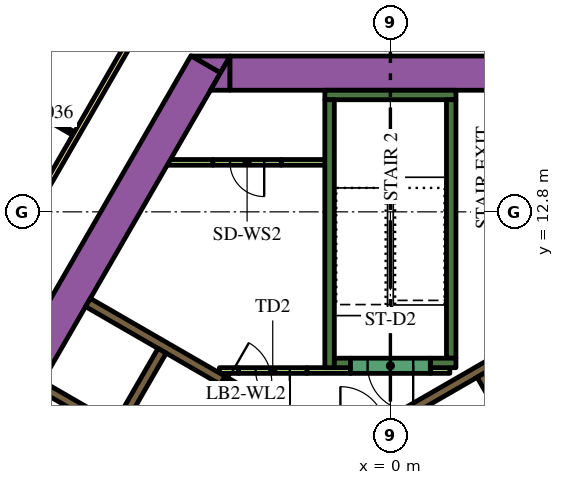
"""IFC4 building model, lengths in metres.
Left out: names, types, materials, properties, quantities, classifications, styles, units other than length and angle.
Written with IfcOpenShell. Run it as: python <this file> out.ifc"""

import sys

from ifc_helpers import new_model, si_unit, direction, frame, frame_2d, origin, place, context, subcontext, project, spatial, polyline, rectangle, outline, extrude, element, fill, save


model = new_model("IFC4")
c1 = context("Model", 3, precision=1e-05, world=origin(), true_north=direction((0.0, 1.0)))
c2 = subcontext(c1, "Body", "Model", "MODEL_VIEW")
j1 = project(units=[si_unit("LENGTHUNIT", "METRE"), si_unit("PLANEANGLEUNIT", "RADIAN")], contexts=[c1])
p1 = place(None, origin())
s1 = spatial("IfcSite", under=j1, at=p1, CompositionType="ELEMENT")
p2 = place(p1, origin())
s2 = spatial("IfcBuilding", under=s1, at=p2, CompositionType="ELEMENT")
p3 = place(p2, frame((0.0, 0.0, 62.7)))
s3 = spatial("IfcBuildingStorey", under=s2, at=p3, CompositionType="ELEMENT", Elevation=62.7)
p4 = place(p3, frame((-14.268, 0.387, 0.0), z_axis=(0.0, 0.0, 1.0), x_axis=(0.499994617707, 0.866028511231, 0.0)))
e1 = element("IfcWall", 1, at=p4, inside=s3, PredefinedType="SOLIDWALL", context=c2, shape_type="SweptSolid", body=[
    extrude(rectangle(XDim=18.817, YDim=0.9, at=frame_2d((9.409, 0.0))), origin(), (0.0, 0.0, 1.0), 3.9),
])
p5 = place(p3, origin())
e2 = element("IfcWall", 2, at=p5, inside=s3, PredefinedType="SOLIDWALL", context=c2, shape_type="SweptSolid", body=[
    extrude(outline(polyline([(-4.215, 16.9), (-4.469, 16.46), (-5.231, 16.9), (-4.215, 16.9)])), origin(), (0.0, 0.0, 1.0), 3.9),
])
p6 = place(p3, frame((-4.224, 16.45, 0.0), z_axis=(0.0, 0.0, 1.0), x_axis=(1.0, 0.0, 0.0)))
e3 = element("IfcWall", 3, at=p6, inside=s3, PredefinedType="SOLIDWALL", context=c2, shape_type="SweptSolid", body=[
    extrude(rectangle(XDim=9.488, YDim=0.9, at=frame_2d((4.744, 0.0))), origin(), (0.0, 0.0, 1.0), 3.9),
])
e4 = element("IfcWall", 4, at=p5, inside=s3, PredefinedType="SOLIDWALL", context=c2, shape_type="SweptSolid", body=[
    extrude(outline(polyline([(-4.734, 16.0), (-4.226, 16.88), (-4.226, 16.0), (-4.734, 16.0)])), origin(), (0.0, 0.0, 1.0), 3.9),
])
p7 = place(p3, frame((-1.725, 15.875, 0.0), z_axis=(0.0, 0.0, 1.0), x_axis=(1.0, 0.0, 0.0)))
e5 = element("IfcWall", 5, at=p7, inside=s3, PredefinedType="SOLIDWALL", context=c2, shape_type="SweptSolid", body=[
    extrude(rectangle(XDim=3.45, YDim=0.25, at=frame_2d((1.725, 0.0))), origin(), (0.0, 0.0, 1.0), 3.9),
])
p8 = place(p3, frame((1.6, 8.95, 0.0), z_axis=(0.0, 0.0, 1.0), x_axis=(0.0, 1.0, 0.0)))
e6 = element("IfcWall", 6, at=p8, inside=s3, PredefinedType="SOLIDWALL", context=c2, shape_type="SweptSolid", body=[
    extrude(rectangle(XDim=6.8, YDim=0.25, at=frame_2d((3.4, 0.0))), origin(), (0.0, 0.0, 1.0), 3.9),
])
p9 = place(p3, frame((1.05, 8.825, 0.0), z_axis=(0.0, 0.0, 1.0), x_axis=(1.0, 0.0, 0.0)))
e7 = element("IfcWall", 7, at=p9, inside=s3, PredefinedType="SOLIDWALL", context=c2, shape_type="SweptSolid", body=[
    extrude(rectangle(XDim=0.675, YDim=0.25, at=frame_2d((0.337, 0.0))), origin(), (0.0, 0.0, 1.0), 3.9),
])
p10 = place(p3, frame((-1.6, 8.7, 0.0), z_axis=(0.0, 0.0, 1.0), x_axis=(0.0, 1.0, 0.0)))
e8 = element("IfcWall", 8, at=p10, inside=s3, PredefinedType="SOLIDWALL", context=c2, shape_type="SweptSolid", body=[
    extrude(rectangle(XDim=7.05, YDim=0.25, at=frame_2d((3.525, 0.0))), origin(), (0.0, 0.0, 1.0), 3.9),
])
p11 = place(p3, frame((-1.475, 8.825, 0.0), z_axis=(0.0, 0.0, 1.0), x_axis=(1.0, 0.0, 0.0)))
e9 = element("IfcWall", 9, at=p11, inside=s3, PredefinedType="SOLIDWALL", context=c2, shape_type="SweptSolid", body=[
    extrude(rectangle(XDim=0.425, YDim=0.25, at=frame_2d((0.212, 0.0))), origin(), (0.0, 0.0, 1.0), 3.9),
])
p12 = place(p3, frame((0.314, 7.456, 0.0), z_axis=(0.0, 0.0, 1.0), x_axis=(0.866013897511, 0.50001992892, 0.0)))
e10 = element("IfcWall", 10, at=p12, inside=s3, PredefinedType="SOLIDWALL", context=c2, shape_type="SweptSolid", body=[
    extrude(rectangle(XDim=3.268, YDim=0.25, at=frame_2d((1.634, 0.0))), origin(), (0.0, 0.0, 1.0), 3.9),
])
e11 = element("IfcWall", 11, at=p5, inside=s3, PredefinedType="SOLIDWALL", context=c2, shape_type="SweptSolid", body=[
    extrude(outline(polyline([(-3.128, 7.481), (-3.259, 7.557), (-3.134, 7.773), (-3.003, 7.698), (-3.128, 7.481)])), origin(), (0.0, 0.0, 1.0), 3.9),
])
p13 = place(p3, frame((-7.314, 7.132, 0.0), z_axis=(0.0, 0.0, 1.0), x_axis=(-0.866008176907, 0.50002983664, 0.0)))
e12 = element("IfcWall", 12, at=p13, inside=s3, PredefinedType="SOLIDWALL", context=c2, shape_type="SweptSolid", body=[
    extrude(rectangle(XDim=2.2, YDim=0.25, at=frame_2d((1.1, 0.0))), origin(), (0.0, 0.0, 1.0), 3.9),
])
p14 = place(p3, frame((-7.959, 10.415, 0.0), z_axis=(0.0, 0.0, 1.0), x_axis=(0.866020958405, -0.500007699544, 0.0)))
e13 = element("IfcWall", 13, at=p14, inside=s3, PredefinedType="SOLIDWALL", context=c2, shape_type="SweptSolid", body=[
    extrude(rectangle(XDim=4.1, YDim=0.25, at=frame_2d((2.05, 0.0))), origin(), (0.0, 0.0, 1.0), 3.9),
])
p15 = place(p3, frame((-3.997, 8.625, 0.0), z_axis=(0.0, 0.0, 1.0), x_axis=(-1.0, 0.0, 0.0)))
e14 = element("IfcWall", 14, at=p15, inside=s3, PredefinedType="PARTITIONING", context=c2, shape_type="SweptSolid", body=[
    extrude(rectangle(XDim=0.502, YDim=0.15, at=frame_2d((0.251, 0.0))), origin(), (0.0, 0.0, 1.0), 2.75),
])
p16 = place(p3, frame((-5.851, 14.102, 0.0), z_axis=(0.0, 0.0, 1.0), x_axis=(1.0, 0.0, 0.0)))
e15 = element("IfcWall", 15, at=p16, inside=s3, PredefinedType="PARTITIONING", context=c2, shape_type="SweptSolid", body=[
    extrude(rectangle(XDim=1.18, YDim=0.15, at=frame_2d((0.59, 0.0))), origin(), (0.0, 0.0, 1.0), 2.75),
])
p17 = place(p3, frame((-2.196, 8.625, 0.0), z_axis=(0.0, 0.0, 1.0), x_axis=(1.0, 0.0, 0.0)))
e16 = element("IfcWall", 16, at=p17, inside=s3, PredefinedType="PARTITIONING", context=c2, shape_type="SweptSolid", body=[
    extrude(rectangle(XDim=1.146, YDim=0.15, at=frame_2d((0.573, 0.0))), origin(), (0.0, 0.0, 1.0), 2.75),
])
p18 = place(p3, frame((1.05, 8.625, 0.0), z_axis=(0.0, 0.0, 1.0), x_axis=(1.0, 0.0, 0.0)))
e17 = element("IfcWall", 17, at=p18, inside=s3, PredefinedType="PARTITIONING", context=c2, shape_type="SweptSolid", body=[
    extrude(rectangle(XDim=0.514, YDim=0.15, at=frame_2d((0.257, 0.0))), origin(), (0.0, 0.0, 1.0), 2.75),
])
p19 = place(p3, frame((-2.871, 14.102, 0.0), z_axis=(0.0, 0.0, 1.0), x_axis=(1.0, 0.0, 0.0)))
e18 = element("IfcWall", 18, at=p19, inside=s3, PredefinedType="PARTITIONING", context=c2, shape_type="SweptSolid", body=[
    extrude(rectangle(XDim=1.196, YDim=0.15, at=frame_2d((0.598, 0.0))), origin(), (0.0, 0.0, 1.0), 2.75),
])
p20 = place(p3, frame((8.565, -2.185, 0.0), z_axis=(0.0, 0.0, 1.0), x_axis=(-0.499997954832, 0.866026584559, 0.0)))
e19 = element("IfcWall", 19, at=p20, inside=s3, PredefinedType="SOLIDWALL", context=c2, shape_type="SweptSolid", body=[
    extrude(rectangle(XDim=12.35, YDim=0.25, at=frame_2d((6.175, 0.0))), origin(), (0.0, 0.0, 1.0), 3.9),
])
p21 = place(p20, frame((5.725, 0.0, 0.0)))
e20 = element("IfcOpeningElement", 20, at=p21, cuts=e19, PredefinedType="OPENING", context=c2, shape_type="SweptSolid", body=[
    extrude(rectangle(XDim=0.9, YDim=2.1, at=frame_2d((0.45, 1.05))), frame((0.0, 0.135, 0.0), z_axis=(0.0, -1.0, 0.0), x_axis=(1.0, 0.0, 0.0)), (0.0, 0.0, 1.0), 0.27),
])
p22 = place(p3, frame((-6.008, 9.144, 0.0), z_axis=(0.0, 0.0, 1.0), x_axis=(-0.500006956611, -0.866021387346, 0.0)))
e21 = element("IfcWall", 21, at=p22, inside=s3, PredefinedType="SOLIDWALL", context=c2, shape_type="SweptSolid", body=[
    extrude(rectangle(XDim=9.83, YDim=0.25, at=frame_2d((4.915, 0.0))), origin(), (0.0, 0.0, 1.0), 3.9),
])
p23 = place(p22, frame((6.985, 0.0, 0.0)))
e22 = element("IfcOpeningElement", 22, at=p23, cuts=e21, PredefinedType="OPENING", context=c2, shape_type="SweptSolid", body=[
    extrude(rectangle(XDim=0.9, YDim=2.1, at=frame_2d((0.45, 1.05))), frame((0.0, 0.135, 0.0), z_axis=(0.0, -1.0, 0.0), x_axis=(1.0, 0.0, 0.0)), (0.0, 0.0, 1.0), 0.27),
])
p24 = place(p3, frame((1.05, 8.75, 0.0), z_axis=(0.0, 0.0, 1.0), x_axis=(-1.0, 0.0, 0.0)))
e23 = element("IfcWall", 23, at=p24, inside=s3, PredefinedType="SOLIDWALL", context=c2, shape_type="SweptSolid", body=[
    extrude(rectangle(XDim=2.1, YDim=0.4, at=frame_2d((1.05, 0.0))), origin(), (0.0, 0.0, 1.0), 3.9),
])
p25 = place(p24, frame((0.45, 0.0, 0.0)))
e24 = element("IfcOpeningElement", 24, at=p25, cuts=e23, PredefinedType="OPENING", context=c2, shape_type="SweptSolid", body=[
    extrude(rectangle(XDim=1.2, YDim=2.1, at=frame_2d((0.6, 1.05))), frame((0.0, 0.21, 0.0), z_axis=(0.0, -1.0, 0.0), x_axis=(1.0, 0.0, 0.0)), (0.0, 0.0, 1.0), 0.42),
])
p26 = place(p3, frame((-2.196, 8.625, 0.0), z_axis=(0.0, 0.0, 1.0), x_axis=(-1.0, 0.0, 0.0)))
e25 = element("IfcWall", 25, at=p26, inside=s3, PredefinedType="PARTITIONING", context=c2, shape_type="SweptSolid", body=[
    extrude(rectangle(XDim=1.8, YDim=0.15, at=frame_2d((0.9, 0.0))), origin(), (0.0, 0.0, 1.0), 2.75),
])
p27 = place(p26, frame((0.45, 0.0, 0.0)))
e26 = element("IfcOpeningElement", 26, at=p27, cuts=e25, PredefinedType="OPENING", context=c2, shape_type="SweptSolid", body=[
    extrude(rectangle(XDim=0.9, YDim=2.1, at=frame_2d((0.45, 1.05))), frame((0.0, 0.085, 0.0), z_axis=(0.0, -1.0, 0.0), x_axis=(1.0, 0.0, 0.0)), (0.0, 0.0, 1.0), 0.17),
])
p28 = place(p3, frame((-4.409, 8.365, 0.0), z_axis=(0.0, 0.0, 1.0), x_axis=(0.866034573852, -0.49998411664, 0.0)))
e27 = element("IfcWall", 27, at=p28, inside=s3, PredefinedType="SOLIDWALL", context=c2, shape_type="SweptSolid", body=[
    extrude(rectangle(XDim=1.4, YDim=0.25, at=frame_2d((0.7, 0.0))), origin(), (0.0, 0.0, 1.0), 3.9),
])
p29 = place(p28, frame((0.1, 0.0, 0.0)))
e28 = element("IfcOpeningElement", 28, at=p29, cuts=e27, PredefinedType="OPENING", context=c2, shape_type="SweptSolid", body=[
    extrude(rectangle(XDim=1.2, YDim=2.1, at=frame_2d((0.6, 1.05))), frame((0.0, 0.135, 0.0), z_axis=(0.0, -1.0, 0.0), x_axis=(1.0, 0.0, 0.0)), (0.0, 0.0, 1.0), 0.27),
])
p30 = place(p3, frame((-2.871, 14.102, 0.0), z_axis=(0.0, 0.0, 1.0), x_axis=(-1.0, 0.0, 0.0)))
e29 = element("IfcWall", 29, at=p30, inside=s3, PredefinedType="PARTITIONING", context=c2, shape_type="SweptSolid", body=[
    extrude(rectangle(XDim=1.8, YDim=0.15, at=frame_2d((0.9, 0.0))), origin(), (0.0, 0.0, 1.0), 2.75),
])
p31 = place(p30, frame((0.45, 0.0, 0.0)))
e30 = element("IfcOpeningElement", 30, at=p31, cuts=e29, PredefinedType="OPENING", context=c2, shape_type="SweptSolid", body=[
    extrude(rectangle(XDim=0.9, YDim=2.1, at=frame_2d((0.45, 1.05))), frame((0.0, 0.085, 0.0), z_axis=(0.0, -1.0, 0.0), x_axis=(1.0, 0.0, 0.0)), (0.0, 0.0, 1.0), 0.17),
])
p32 = place(p3, frame((-19.081, -3.9, 0.0), z_axis=(0.0, 0.0, 1.0), x_axis=(0.499998313975, 0.866026377209, 0.0)))
e31 = element("IfcWall", 31, at=p32, inside=s3, PredefinedType="PARTITIONING", context=c2, shape_type="SweptSolid", body=[
    extrude(rectangle(XDim=25.766, YDim=0.15, at=frame_2d((12.883, 0.0))), origin(), (0.0, 0.0, 1.0), 2.75),
])
p33 = place(p32, frame((24.586, 0.0, 0.0)))
e32 = element("IfcOpeningElement", 32, at=p33, cuts=e31, PredefinedType="OPENING", context=c2, shape_type="SweptSolid", body=[
    extrude(rectangle(XDim=1.0, YDim=2.1, at=frame_2d((0.5, 1.05))), frame((0.0, 0.085, 0.0), z_axis=(0.0, -1.0, 0.0), x_axis=(1.0, 0.0, 0.0)), (0.0, 0.0, 1.0), 0.17),
])
p34 = place(p32, frame((9.948, 0.0, 0.0)))
e33 = element("IfcOpeningElement", 33, at=p34, cuts=e31, PredefinedType="OPENING", context=c2, shape_type="SweptSolid", body=[
    extrude(rectangle(XDim=1.0, YDim=2.1, at=frame_2d((0.5, 1.05))), frame((0.0, 0.085, 0.0), z_axis=(0.0, -1.0, 0.0), x_axis=(1.0, 0.0, 0.0)), (0.0, 0.0, 1.0), 0.17),
])
p35 = place(p32, frame((7.782, 0.0, 0.0)))
e34 = element("IfcOpeningElement", 34, at=p35, cuts=e31, PredefinedType="OPENING", context=c2, shape_type="SweptSolid", body=[
    extrude(rectangle(XDim=0.9, YDim=2.1, at=frame_2d((0.45, 1.05))), frame((0.0, 0.085, 0.0), z_axis=(0.0, -1.0, 0.0), x_axis=(1.0, 0.0, 0.0)), (0.0, 0.0, 1.0), 0.17),
])
p36 = place(p32, frame((4.658, 0.0, 0.0)))
e35 = element("IfcOpeningElement", 35, at=p36, cuts=e31, PredefinedType="OPENING", context=c2, shape_type="SweptSolid", body=[
    extrude(rectangle(XDim=0.9, YDim=2.1, at=frame_2d((0.45, 1.05))), frame((0.0, 0.085, 0.0), z_axis=(0.0, -1.0, 0.0), x_axis=(1.0, 0.0, 0.0)), (0.0, 0.0, 1.0), 0.17),
])
p37 = place(p3, frame((-8.337, 14.861, 0.0), z_axis=(0.0, 0.0, 1.0), x_axis=(-0.866034573852, 0.49998411664, 0.0)))
e36 = element("IfcWall", 36, at=p37, inside=s3, PredefinedType="PARTITIONING", context=c2, shape_type="SweptSolid", body=[
    extrude(rectangle(XDim=2.8, YDim=0.1, at=frame_2d((1.4, 0.0))), origin(), (0.0, 0.0, 1.0), 2.75),
])
p38 = place(p37, frame((0.6, 0.0, 0.0)))
e37 = element("IfcOpeningElement", 37, at=p38, cuts=e36, PredefinedType="OPENING", context=c2, shape_type="SweptSolid", body=[
    extrude(rectangle(XDim=0.9, YDim=2.1, at=frame_2d((0.45, 1.05))), frame((0.0, 0.06, 0.0), z_axis=(0.0, -1.0, 0.0), x_axis=(1.0, 0.0, 0.0)), (0.0, 0.0, 1.0), 0.12),
])
p39 = place(p25, origin())
e38 = element("IfcDoor", 38, at=p39, inside=s3, OperationType="SINGLE_SWING_LEFT", PredefinedType="DOOR", context=c2, shape_type="SweptSolid", body=[
    extrude(rectangle(XDim=1.2, YDim=2.1, at=frame_2d((0.6, 1.05))), frame((0.0, 0.025, 0.0), z_axis=(0.0, -1.0, 0.0), x_axis=(1.0, 0.0, 0.0)), (0.0, 0.0, 1.0), 0.05),
])
fill(e24, e38)
p40 = place(p27, origin())
e39 = element("IfcDoor", 39, at=p40, inside=s3, OperationType="SINGLE_SWING_LEFT", PredefinedType="DOOR", context=c2, shape_type="SweptSolid", body=[
    extrude(rectangle(XDim=0.9, YDim=2.1, at=frame_2d((0.45, 1.05))), frame((0.0, 0.025, 0.0), z_axis=(0.0, -1.0, 0.0), x_axis=(1.0, 0.0, 0.0)), (0.0, 0.0, 1.0), 0.05),
])
fill(e26, e39)
p41 = place(p29, origin())
e40 = element("IfcDoor", 40, at=p41, inside=s3, OperationType="SINGLE_SWING_LEFT", PredefinedType="DOOR", context=c2, shape_type="SweptSolid", body=[
    extrude(rectangle(XDim=1.2, YDim=2.1, at=frame_2d((0.6, 1.05))), frame((0.0, 0.025, 0.0), z_axis=(0.0, -1.0, 0.0), x_axis=(1.0, 0.0, 0.0)), (0.0, 0.0, 1.0), 0.05),
])
fill(e28, e40)
p42 = place(p31, origin())
e41 = element("IfcDoor", 41, at=p42, inside=s3, OperationType="SINGLE_SWING_LEFT", PredefinedType="DOOR", context=c2, shape_type="SweptSolid", body=[
    extrude(rectangle(XDim=0.9, YDim=2.1, at=frame_2d((0.45, 1.05))), frame((0.0, 0.025, 0.0), z_axis=(0.0, -1.0, 0.0), x_axis=(1.0, 0.0, 0.0)), (0.0, 0.0, 1.0), 0.05),
])
fill(e30, e41)
p43 = place(p38, origin())
e42 = element("IfcDoor", 42, at=p43, inside=s3, OperationType="SINGLE_SWING_RIGHT", PredefinedType="DOOR", context=c2, shape_type="SweptSolid", body=[
    extrude(rectangle(XDim=0.9, YDim=2.1, at=frame_2d((0.45, 1.05))), frame((0.0, 0.025, 0.0), z_axis=(0.0, -1.0, 0.0), x_axis=(1.0, 0.0, 0.0)), (0.0, 0.0, 1.0), 0.05),
])
fill(e37, e42)
save(model, sys.argv[1])
